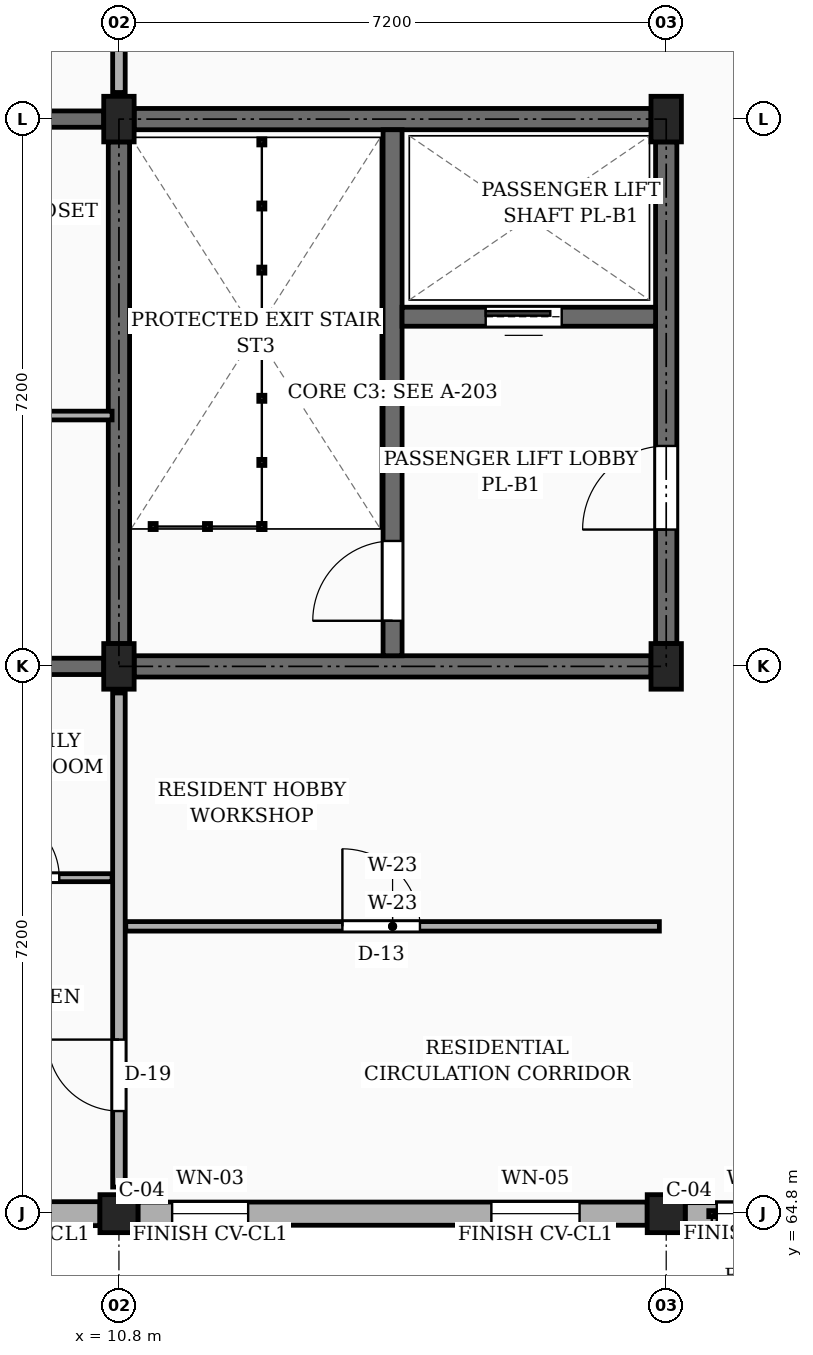
"""IFC4 building model, lengths in metres.
Left out: names, types, materials, properties, quantities, classifications, styles, units other than length and angle.
Written with IfcOpenShell. Run it as: python <this file> out.ifc"""

import sys

from ifc_helpers import new_model, si_unit, direction, frame, frame_2d, origin, origin_2d, place, context, subcontext, project, spatial, rectangle, extrude, element, fill, save


model = new_model("IFC4")
c1 = context("Model", 3, precision=1e-05, world=origin(), true_north=direction((0.0, 1.0)))
c2 = subcontext(c1, "Body", "Model", "MODEL_VIEW")
j1 = project(units=[si_unit("LENGTHUNIT", "METRE"), si_unit("PLANEANGLEUNIT", "RADIAN")], contexts=[c1])
p1 = place(None, origin())
s1 = spatial("IfcSite", under=j1, at=p1, CompositionType="ELEMENT")
p2 = place(p1, origin())
s2 = spatial("IfcBuilding", under=s1, at=p2, CompositionType="ELEMENT")
p3 = place(p2, frame((0.0, 0.0, 26.55)))
s3 = spatial("IfcBuildingStorey", under=s2, at=p3, CompositionType="ELEMENT", Elevation=26.55)
p4 = place(p3, frame((10.8, 64.8, 0.0), z_axis=(0.0, 0.0, 1.0), x_axis=(1.0, 0.0, 0.0)))
e1 = element("IfcColumn", 1, at=p4, inside=s3, PredefinedType="COLUMN", context=c2, shape_type="SweptSolid", body=[
    extrude(rectangle(XDim=0.5, YDim=0.5, at=origin_2d()), origin(), (0.0, 0.0, 1.0), 3.15),
])
for number, where, z_axis, x_axis in (
    (2, (10.8, 72.0, 0.0), (0.0, 0.0, 1.0), (1.0, 0.0, 0.0)),
    (3, (10.8, 79.2, 0.0), (0.0, 0.0, 1.0), (1.0, 0.0, 0.0)),
):
    element("IfcColumn", number, at=place(p3, frame(where, z_axis=z_axis, x_axis=x_axis)), inside=s3, PredefinedType="COLUMN", context=c2, shape_type="SweptSolid", body=[
        extrude(rectangle(XDim=0.4, YDim=0.6, at=origin_2d()), origin(), (0.0, 0.0, 1.0), 3.15),
    ])
p5 = place(p3, frame((18.0, 64.8, 0.0), z_axis=(0.0, 0.0, 1.0), x_axis=(1.0, 0.0, 0.0)))
e4 = element("IfcColumn", 4, at=p5, inside=s3, PredefinedType="COLUMN", context=c2, shape_type="SweptSolid", body=[
    extrude(rectangle(XDim=0.5, YDim=0.5, at=origin_2d()), origin(), (0.0, 0.0, 1.0), 3.15),
])
for number, where, z_axis, x_axis in (
    (5, (18.0, 72.0, 0.0), (0.0, 0.0, 1.0), (1.0, 0.0, 0.0)),
    (6, (18.0, 79.2, 0.0), (0.0, 0.0, 1.0), (1.0, 0.0, 0.0)),
):
    element("IfcColumn", number, at=place(p3, frame(where, z_axis=z_axis, x_axis=x_axis)), inside=s3, PredefinedType="COLUMN", context=c2, shape_type="SweptSolid", body=[
        extrude(rectangle(XDim=0.4, YDim=0.6, at=origin_2d()), origin(), (0.0, 0.0, 1.0), 3.15),
    ])
p6 = place(p3, frame((3.85, 72.0, 0.0), z_axis=(0.0, 0.0, 1.0), x_axis=(1.0, 0.0, 0.0)))
e7 = element("IfcWall", 7, at=p6, inside=s3, PredefinedType="SOLIDWALL", context=c2, shape_type="SweptSolid", body=[
    extrude(rectangle(XDim=6.75, YDim=0.215, at=frame_2d((3.375, 0.0))), origin(), (0.0, 0.0, 1.0), 2.22),
])
p7 = place(p6, frame((1.35, 0.0, 0.0)))
e8 = element("IfcOpeningElement", 8, at=p7, cuts=e7, PredefinedType="OPENING", context=c2, shape_type="SweptSolid", body=[
    extrude(rectangle(XDim=0.98, YDim=2.12, at=frame_2d((0.49, 1.06))), frame((0.0, 0.118, 0.0), z_axis=(0.0, -1.0, 0.0), x_axis=(1.0, 0.0, 0.0)), (0.0, 0.0, 1.0), 0.235),
])
p8 = place(p3, frame((3.85, 79.2, 0.0), z_axis=(0.0, 0.0, 1.0), x_axis=(1.0, 0.0, 0.0)))
e9 = element("IfcWall", 9, at=p8, inside=s3, PredefinedType="SOLIDWALL", context=c2, shape_type="SweptSolid", body=[
    extrude(rectangle(XDim=6.75, YDim=0.215, at=frame_2d((3.375, 0.0))), origin(), (0.0, 0.0, 1.0), 2.22),
])
p9 = place(p3, frame((3.85, 64.8, 0.0), z_axis=(0.0, 0.0, 1.0), x_axis=(1.0, 0.0, 0.0)))
e10 = element("IfcWall", 10, at=p9, inside=s3, PredefinedType="SOLIDWALL", context=c2, shape_type="SweptSolid", body=[
    extrude(rectangle(XDim=6.7, YDim=0.315, at=frame_2d((3.35, 0.0))), origin(), (0.0, 0.0, 1.0), 2.46),
])
p10 = place(p9, frame((1.91, 0.0, 0.78)))
e11 = element("IfcOpeningElement", 11, at=p10, cuts=e10, PredefinedType="OPENING", context=c2, shape_type="SweptSolid", body=[
    extrude(rectangle(XDim=0.85, YDim=1.15, at=frame_2d((0.425, 0.575))), frame((0.0, 0.167, 0.0), z_axis=(0.0, -1.0, 0.0), x_axis=(1.0, 0.0, 0.0)), (0.0, 0.0, 1.0), 0.335),
])
p11 = place(p9, frame((5.045, 0.0, 0.78)))
e12 = element("IfcOpeningElement", 12, at=p11, cuts=e10, PredefinedType="OPENING", context=c2, shape_type="SweptSolid", body=[
    extrude(rectangle(XDim=1.0, YDim=1.15, at=frame_2d((0.5, 0.575))), frame((0.0, 0.167, 0.0), z_axis=(0.0, -1.0, 0.0), x_axis=(1.0, 0.0, 0.0)), (0.0, 0.0, 1.0), 0.335),
])
p12 = place(p3, frame((11.05, 64.8, 0.0), z_axis=(0.0, 0.0, 1.0), x_axis=(1.0, 0.0, 0.0)))
e13 = element("IfcWall", 13, at=p12, inside=s3, PredefinedType="SOLIDWALL", context=c2, shape_type="SweptSolid", body=[
    extrude(rectangle(XDim=6.7, YDim=0.305, at=frame_2d((3.35, 0.0))), origin(), (0.0, 0.0, 1.0), 2.46),
])
p13 = place(p12, frame((0.45, 0.0, 0.78)))
e14 = element("IfcOpeningElement", 14, at=p13, cuts=e13, PredefinedType="OPENING", context=c2, shape_type="SweptSolid", body=[
    extrude(rectangle(XDim=1.0, YDim=1.15, at=frame_2d((0.5, 0.575))), frame((0.0, 0.163, 0.0), z_axis=(0.0, -1.0, 0.0), x_axis=(1.0, 0.0, 0.0)), (0.0, 0.0, 1.0), 0.325),
])
p14 = place(p12, frame((4.65, 0.0, 0.78)))
e15 = element("IfcOpeningElement", 15, at=p14, cuts=e13, PredefinedType="OPENING", context=c2, shape_type="SweptSolid", body=[
    extrude(rectangle(XDim=1.16, YDim=1.15, at=frame_2d((0.58, 0.575))), frame((0.0, 0.163, 0.0), z_axis=(0.0, -1.0, 0.0), x_axis=(1.0, 0.0, 0.0)), (0.0, 0.0, 1.0), 0.325),
])
p15 = place(p3, frame((18.25, 64.8, 0.0), z_axis=(0.0, 0.0, 1.0), x_axis=(1.0, 0.0, 0.0)))
e16 = element("IfcWall", 16, at=p15, inside=s3, PredefinedType="SOLIDWALL", context=c2, shape_type="SweptSolid", body=[
    extrude(rectangle(XDim=6.7, YDim=0.29, at=frame_2d((3.35, 0.0))), origin(), (0.0, 0.0, 1.0), 2.46),
])
p16 = place(p15, frame((0.415, 0.0, 0.78)))
e17 = element("IfcOpeningElement", 17, at=p16, cuts=e16, PredefinedType="OPENING", context=c2, shape_type="SweptSolid", body=[
    extrude(rectangle(XDim=1.16, YDim=1.15, at=frame_2d((0.58, 0.575))), frame((0.0, 0.155, 0.0), z_axis=(0.0, -1.0, 0.0), x_axis=(1.0, 0.0, 0.0)), (0.0, 0.0, 1.0), 0.31),
])
p17 = place(p15, frame((2.16, 0.0, 0.78)))
e18 = element("IfcOpeningElement", 18, at=p17, cuts=e16, PredefinedType="OPENING", context=c2, shape_type="SweptSolid", body=[
    extrude(rectangle(XDim=1.32, YDim=1.15, at=frame_2d((0.66, 0.575))), frame((0.0, 0.155, 0.0), z_axis=(0.0, -1.0, 0.0), x_axis=(1.0, 0.0, 0.0)), (0.0, 0.0, 1.0), 0.31),
])
p18 = place(p15, frame((4.735, 0.0, 0.78)))
e19 = element("IfcOpeningElement", 19, at=p18, cuts=e16, PredefinedType="OPENING", context=c2, shape_type="SweptSolid", body=[
    extrude(rectangle(XDim=0.88, YDim=1.26, at=frame_2d((0.44, 0.63))), frame((0.0, 0.155, 0.0), z_axis=(0.0, -1.0, 0.0), x_axis=(1.0, 0.0, 0.0)), (0.0, 0.0, 1.0), 0.31),
])
p19 = place(p3, frame((10.8, 72.3, 0.0), z_axis=(0.0, 0.0, 1.0), x_axis=(0.0, 1.0, 0.0)))
e20 = element("IfcWall", 20, at=p19, inside=s3, PredefinedType="SHEAR", context=c2, shape_type="SweptSolid", body=[
    extrude(rectangle(XDim=6.6, YDim=0.28, at=frame_2d((3.3, 0.0))), origin(), (0.0, 0.0, 1.0), 2.89),
])
p20 = place(p3, frame((11.0, 79.2, 0.0), z_axis=(0.0, 0.0, 1.0), x_axis=(1.0, 0.0, 0.0)))
e21 = element("IfcWall", 21, at=p20, inside=s3, PredefinedType="SHEAR", context=c2, shape_type="SweptSolid", body=[
    extrude(rectangle(XDim=6.8, YDim=0.28, at=frame_2d((3.4, 0.0))), origin(), (0.0, 0.0, 1.0), 2.89),
])
p21 = place(p3, frame((18.0, 72.3, 0.0), z_axis=(0.0, 0.0, 1.0), x_axis=(0.0, 1.0, 0.0)))
e22 = element("IfcWall", 22, at=p21, inside=s3, PredefinedType="SHEAR", context=c2, shape_type="SweptSolid", body=[
    extrude(rectangle(XDim=6.6, YDim=0.28, at=frame_2d((3.3, 0.0))), origin(), (0.0, 0.0, 1.0), 2.89),
])
p22 = place(p21, frame((1.5, 0.0, 0.0)))
e23 = element("IfcOpeningElement", 23, at=p22, cuts=e22, PredefinedType="OPENING", context=c2, shape_type="SweptSolid", body=[
    extrude(rectangle(XDim=1.1, YDim=2.15, at=frame_2d((0.55, 1.075))), frame((0.0, 0.15, 0.0), z_axis=(0.0, -1.0, 0.0), x_axis=(1.0, 0.0, 0.0)), (0.0, 0.0, 1.0), 0.3),
])
p23 = place(p3, frame((11.0, 72.0, 0.0), z_axis=(0.0, 0.0, 1.0), x_axis=(1.0, 0.0, 0.0)))
e24 = element("IfcWall", 24, at=p23, inside=s3, PredefinedType="SHEAR", context=c2, shape_type="SweptSolid", body=[
    extrude(rectangle(XDim=6.8, YDim=0.28, at=frame_2d((3.4, 0.0))), origin(), (0.0, 0.0, 1.0), 2.89),
])
p24 = place(p3, frame((14.4, 72.14, 0.0), z_axis=(0.0, 0.0, 1.0), x_axis=(0.0, 1.0, 0.0)))
e25 = element("IfcWall", 25, at=p24, inside=s3, PredefinedType="SHEAR", context=c2, shape_type="SweptSolid", body=[
    extrude(rectangle(XDim=6.92, YDim=0.25, at=frame_2d((3.46, 0.0))), origin(), (0.0, 0.0, 1.0), 2.89),
])
p25 = place(p24, frame((0.46, 0.0, 0.0)))
e26 = element("IfcOpeningElement", 26, at=p25, cuts=e25, PredefinedType="OPENING", context=c2, shape_type="SweptSolid", body=[
    extrude(rectangle(XDim=1.05, YDim=2.15, at=frame_2d((0.525, 1.075))), frame((0.0, 0.135, 0.0), z_axis=(0.0, -1.0, 0.0), x_axis=(1.0, 0.0, 0.0)), (0.0, 0.0, 1.0), 0.27),
])
p26 = place(p3, frame((14.525, 76.6, 0.0), z_axis=(0.0, 0.0, 1.0), x_axis=(1.0, 0.0, 0.0)))
e27 = element("IfcWall", 27, at=p26, inside=s3, PredefinedType="SHEAR", context=c2, shape_type="SweptSolid", body=[
    extrude(rectangle(XDim=3.335, YDim=0.25, at=frame_2d((1.667, 0.0))), origin(), (0.0, 0.0, 1.0), 2.89),
])
p27 = place(p26, frame((1.1, 0.0, 0.0)))
e28 = element("IfcOpeningElement", 28, at=p27, cuts=e27, PredefinedType="OPENING", context=c2, shape_type="SweptSolid", body=[
    extrude(rectangle(XDim=1.0, YDim=2.2, at=frame_2d((0.5, 1.1))), frame((0.0, 0.135, 0.0), z_axis=(0.0, -1.0, 0.0), x_axis=(1.0, 0.0, 0.0)), (0.0, 0.0, 1.0), 0.27),
])
p28 = place(p3, frame((10.8, 65.15, 0.0), z_axis=(0.0, 0.0, 1.0), x_axis=(0.0, 1.0, 0.0)))
e29 = element("IfcWall", 29, at=p28, inside=s3, PredefinedType="PARTITIONING", context=c2, shape_type="SweptSolid", body=[
    extrude(rectangle(XDim=6.5, YDim=0.165, at=frame_2d((3.25, 0.0))), origin(), (0.0, 0.0, 1.0), 2.325),
])
p29 = place(p28, frame((1.0, 0.0, 0.0)))
e30 = element("IfcOpeningElement", 30, at=p29, cuts=e29, PredefinedType="OPENING", context=c2, shape_type="SweptSolid", body=[
    extrude(rectangle(XDim=0.94, YDim=2.12, at=frame_2d((0.47, 1.06))), frame((0.0, 0.093, 0.0), z_axis=(0.0, -1.0, 0.0), x_axis=(1.0, 0.0, 0.0)), (0.0, 0.0, 1.0), 0.185),
])
p30 = place(p3, frame((10.8, 79.55, 0.0), z_axis=(0.0, 0.0, 1.0), x_axis=(0.0, 1.0, 0.0)))
e31 = element("IfcWall", 31, at=p30, inside=s3, PredefinedType="PARTITIONING", context=c2, shape_type="SweptSolid", body=[
    extrude(rectangle(XDim=6.5, YDim=0.165, at=frame_2d((3.25, 0.0))), origin(), (0.0, 0.0, 1.0), 2.325),
])
p31 = place(p30, frame((1.1, 0.0, 0.0)))
e32 = element("IfcOpeningElement", 32, at=p31, cuts=e31, PredefinedType="OPENING", context=c2, shape_type="SweptSolid", body=[
    extrude(rectangle(XDim=1.14, YDim=2.18, at=frame_2d((0.57, 1.09))), frame((0.0, 0.093, 0.0), z_axis=(0.0, -1.0, 0.0), x_axis=(1.0, 0.0, 0.0)), (0.0, 0.0, 1.0), 0.185),
])
p32 = place(p3, frame((10.89, 68.58, 0.0), z_axis=(0.0, 0.0, 1.0), x_axis=(1.0, 0.0, 0.0)))
e33 = element("IfcWall", 33, at=p32, inside=s3, PredefinedType="PARTITIONING", context=c2, shape_type="SweptSolid", body=[
    extrude(rectangle(XDim=7.02, YDim=0.125, at=frame_2d((3.51, 0.0))), origin(), (0.0, 0.0, 1.0), 2.325),
])
p33 = place(p32, frame((2.85, 0.0, 0.0)))
e34 = element("IfcOpeningElement", 34, at=p33, cuts=e33, PredefinedType="OPENING", context=c2, shape_type="SweptSolid", body=[
    extrude(rectangle(XDim=1.02, YDim=2.15, at=frame_2d((0.51, 1.075))), frame((0.0, 0.073, 0.0), z_axis=(0.0, -1.0, 0.0), x_axis=(1.0, 0.0, 0.0)), (0.0, 0.0, 1.0), 0.145),
])
p34 = place(p3, frame((8.45, 69.22, 0.0), z_axis=(0.0, 0.0, 1.0), x_axis=(1.0, 0.0, 0.0)))
e35 = element("IfcWall", 35, at=p34, inside=s3, PredefinedType="PARTITIONING", context=c2, shape_type="SweptSolid", body=[
    extrude(rectangle(XDim=2.26, YDim=0.105, at=frame_2d((1.13, 0.0))), origin(), (0.0, 0.0, 1.0), 2.325),
])
p35 = place(p34, frame((0.695, 0.0, 0.0)))
e36 = element("IfcOpeningElement", 36, at=p35, cuts=e35, PredefinedType="OPENING", context=c2, shape_type="SweptSolid", body=[
    extrude(rectangle(XDim=0.87, YDim=2.05, at=frame_2d((0.435, 1.025))), frame((0.0, 0.062, 0.0), z_axis=(0.0, -1.0, 0.0), x_axis=(1.0, 0.0, 0.0)), (0.0, 0.0, 1.0), 0.125),
])
p36 = place(p3, frame((3.775, 75.3, 0.0), z_axis=(0.0, 0.0, 1.0), x_axis=(1.0, 0.0, 0.0)))
e37 = element("IfcWall", 37, at=p36, inside=s3, PredefinedType="PARTITIONING", context=c2, shape_type="SweptSolid", body=[
    extrude(rectangle(XDim=6.935, YDim=0.115, at=frame_2d((3.468, 0.0))), origin(), (0.0, 0.0, 1.0), 2.325),
])
p37 = place(p36, frame((1.1, 0.0, 0.0)))
e38 = element("IfcOpeningElement", 38, at=p37, cuts=e37, PredefinedType="OPENING", context=c2, shape_type="SweptSolid", body=[
    extrude(rectangle(XDim=0.87, YDim=2.05, at=frame_2d((0.435, 1.025))), frame((0.0, 0.067, 0.0), z_axis=(0.0, -1.0, 0.0), x_axis=(1.0, 0.0, 0.0)), (0.0, 0.0, 1.0), 0.135),
])
p38 = place(p36, frame((4.5, 0.0, 0.0)))
e39 = element("IfcOpeningElement", 39, at=p38, cuts=e37, PredefinedType="OPENING", context=c2, shape_type="SweptSolid", body=[
    extrude(rectangle(XDim=0.88, YDim=2.08, at=frame_2d((0.44, 1.04))), frame((0.0, 0.067, 0.0), z_axis=(0.0, -1.0, 0.0), x_axis=(1.0, 0.0, 0.0)), (0.0, 0.0, 1.0), 0.135),
])
p39 = place(p13, origin())
e40 = element("IfcWindow", 40, at=p39, inside=s3, PartitioningType="SINGLE_PANEL", PredefinedType="WINDOW", context=c2, shape_type="SweptSolid", body=[
    extrude(rectangle(XDim=1.0, YDim=1.15, at=frame_2d((0.5, 0.575))), frame((0.0, 0.03, 0.0), z_axis=(0.0, -1.0, 0.0), x_axis=(1.0, 0.0, 0.0)), (0.0, 0.0, 1.0), 0.06),
])
fill(e14, e40)
p40 = place(p14, origin())
e41 = element("IfcWindow", 41, at=p40, inside=s3, PartitioningType="SINGLE_PANEL", PredefinedType="WINDOW", context=c2, shape_type="SweptSolid", body=[
    extrude(rectangle(XDim=1.16, YDim=1.15, at=frame_2d((0.58, 0.575))), frame((0.0, 0.03, 0.0), z_axis=(0.0, -1.0, 0.0), x_axis=(1.0, 0.0, 0.0)), (0.0, 0.0, 1.0), 0.06),
])
fill(e15, e41)
p41 = place(p16, origin())
e42 = element("IfcWindow", 42, at=p41, inside=s3, PartitioningType="SINGLE_PANEL", PredefinedType="WINDOW", context=c2, shape_type="SweptSolid", body=[
    extrude(rectangle(XDim=1.16, YDim=1.15, at=frame_2d((0.58, 0.575))), frame((0.0, 0.03, 0.0), z_axis=(0.0, -1.0, 0.0), x_axis=(1.0, 0.0, 0.0)), (0.0, 0.0, 1.0), 0.06),
])
fill(e17, e42)
p42 = place(p22, frame((1.1, 0.0, 0.0), z_axis=(0.0, 0.0, 1.0), x_axis=(-1.0, 0.0, 0.0)))
e43 = element("IfcDoor", 43, at=p42, inside=s3, OperationType="SINGLE_SWING_LEFT", PredefinedType="DOOR", context=c2, shape_type="SweptSolid", body=[
    extrude(rectangle(XDim=1.1, YDim=2.15, at=frame_2d((0.55, 1.075))), frame((0.0, 0.025, 0.0), z_axis=(0.0, -1.0, 0.0), x_axis=(1.0, 0.0, 0.0)), (0.0, 0.0, 1.0), 0.05),
])
fill(e23, e43)
p43 = place(p25, origin())
e44 = element("IfcDoor", 44, at=p43, inside=s3, OperationType="SINGLE_SWING_LEFT", PredefinedType="DOOR", context=c2, shape_type="SweptSolid", body=[
    extrude(rectangle(XDim=1.05, YDim=2.15, at=frame_2d((0.525, 1.075))), frame((0.0, 0.025, 0.0), z_axis=(0.0, -1.0, 0.0), x_axis=(1.0, 0.0, 0.0)), (0.0, 0.0, 1.0), 0.05),
])
fill(e26, e44)
p44 = place(p27, origin())
e45 = element("IfcDoor", 45, at=p44, inside=s3, OperationType="SLIDING_TO_LEFT", PredefinedType="DOOR", context=c2, shape_type="SweptSolid", body=[
    extrude(rectangle(XDim=1.0, YDim=2.2, at=frame_2d((0.5, 1.1))), frame((0.0, 0.025, 0.0), z_axis=(0.0, -1.0, 0.0), x_axis=(1.0, 0.0, 0.0)), (0.0, 0.0, 1.0), 0.05),
])
fill(e28, e45)
p45 = place(p29, origin())
e46 = element("IfcDoor", 46, at=p45, inside=s3, OperationType="SINGLE_SWING_RIGHT", PredefinedType="DOOR", context=c2, shape_type="SweptSolid", body=[
    extrude(rectangle(XDim=0.94, YDim=2.12, at=frame_2d((0.47, 1.06))), frame((0.0, 0.025, 0.0), z_axis=(0.0, -1.0, 0.0), x_axis=(1.0, 0.0, 0.0)), (0.0, 0.0, 1.0), 0.05),
])
fill(e30, e46)
p46 = place(p33, origin())
e47 = element("IfcDoor", 47, at=p46, inside=s3, OperationType="SINGLE_SWING_LEFT", PredefinedType="DOOR", context=c2, shape_type="SweptSolid", body=[
    extrude(rectangle(XDim=1.02, YDim=2.15, at=frame_2d((0.51, 1.075))), frame((0.0, 0.025, 0.0), z_axis=(0.0, -1.0, 0.0), x_axis=(1.0, 0.0, 0.0)), (0.0, 0.0, 1.0), 0.05),
])
fill(e34, e47)
p47 = place(p35, origin())
e48 = element("IfcDoor", 48, at=p47, inside=s3, OperationType="SINGLE_SWING_LEFT", PredefinedType="DOOR", context=c2, shape_type="SweptSolid", body=[
    extrude(rectangle(XDim=0.87, YDim=2.05, at=frame_2d((0.435, 1.025))), frame((0.0, 0.025, 0.0), z_axis=(0.0, -1.0, 0.0), x_axis=(1.0, 0.0, 0.0)), (0.0, 0.0, 1.0), 0.05),
])
fill(e36, e48)
save(model, sys.argv[1])
